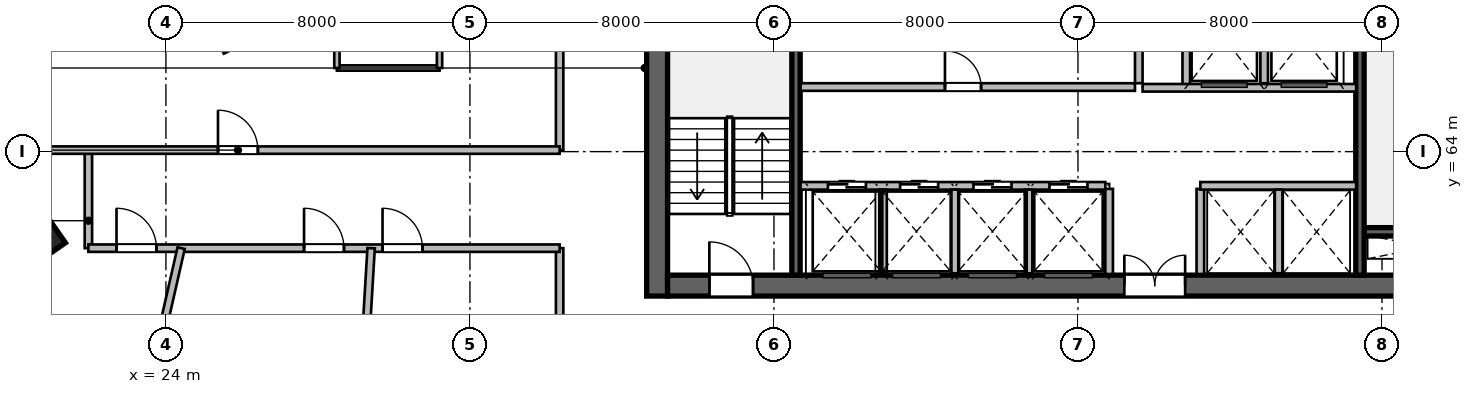
"""IFC4 building model, lengths in metres.
Left out: names, types, materials, properties, quantities, classifications, styles, units other than length and angle.
Written with IfcOpenShell. Run it as: python <this file> out.ifc"""

import sys

from ifc_helpers import new_model, si_unit, direction, frame, frame_2d, origin, origin_2d, place, context, subcontext, project, spatial, rectangle, extrude, source, transform, mapped, element, fill, save


model = new_model("IFC4")
c1 = context("Model", 3, precision=1e-05, world=origin(), true_north=direction((0.0, 1.0)))
c2 = subcontext(c1, "Body", "Model", "MODEL_VIEW")
j1 = project(units=[si_unit("LENGTHUNIT", "METRE"), si_unit("PLANEANGLEUNIT", "RADIAN")], contexts=[c1])
p1 = place(None, origin())
s1 = spatial("IfcSite", under=j1, at=p1, CompositionType="ELEMENT")
p2 = place(p1, origin())
s2 = spatial("IfcBuilding", under=s1, at=p2, CompositionType="ELEMENT")
p3 = place(p2, frame((0.0, 0.0, 78.6)))
s3 = spatial("IfcBuildingStorey", under=s2, at=p3, CompositionType="ELEMENT", Elevation=78.6)
m1 = source(origin(), c2, "Body", "SweptSolid", [
    extrude(rectangle(XDim=12.0, YDim=0.55, at=frame_2d((6.0, 0.0))), origin(), (0.0, 0.0, 1.0), 3.6),
])
p4 = place(p3, frame((36.925, 60.2, 0.0), z_axis=(0.0, 0.0, 1.0), x_axis=(0.0, 1.0, 0.0)))
e1 = element("IfcWall", 1, at=p4, inside=s3, PredefinedType="SHEAR", context=c2, shape_type="MappedRepresentation", body=[
    mapped(m1, transform((0.0, 0.0, 0.0), scale=1.0)),
])
m2 = source(origin(), c2, "Body", "SweptSolid", [
    extrude(rectangle(XDim=21.6, YDim=0.55, at=frame_2d((10.8, 0.0))), origin(), (0.0, 0.0, 1.0), 3.6),
])
p5 = place(p3, frame((37.2, 60.475, 0.0), z_axis=(0.0, 0.0, 1.0), x_axis=(1.0, 0.0, 0.0)))
e2 = element("IfcWall", 2, at=p5, inside=s3, PredefinedType="SHEAR", context=c2, shape_type="MappedRepresentation", body=[
    mapped(m2, transform((0.0, 0.0, 0.0), scale=1.0)),
])
p6 = place(p5, frame((1.1, 0.0, 0.0)))
e3 = element("IfcOpeningElement", 3, at=p6, cuts=e2, PredefinedType="OPENING", context=c2, shape_type="SweptSolid", body=[
    extrude(rectangle(XDim=1.15, YDim=2.15, at=frame_2d((0.575, 1.075))), frame((0.0, 0.285, 0.0), z_axis=(0.0, -1.0, 0.0), x_axis=(1.0, 0.0, 0.0)), (0.0, 0.0, 1.0), 0.57),
])
p7 = place(p5, frame((19.5, 0.0, 0.0)))
e4 = element("IfcOpeningElement", 4, at=p7, cuts=e2, PredefinedType="OPENING", context=c2, shape_type="SweptSolid", body=[
    extrude(rectangle(XDim=0.9, YDim=2.1, at=frame_2d((0.45, 1.05))), frame((0.0, 0.285, 0.0), z_axis=(0.0, -1.0, 0.0), x_axis=(1.0, 0.0, 0.0)), (0.0, 0.0, 1.0), 0.57),
])
p8 = place(p5, frame((12.02, 0.0, 0.0)))
e5 = element("IfcOpeningElement", 5, at=p8, cuts=e2, PredefinedType="OPENING", context=c2, shape_type="SweptSolid", body=[
    extrude(rectangle(XDim=1.6, YDim=2.15, at=frame_2d((0.8, 1.075))), frame((0.0, 0.285, 0.0), z_axis=(0.0, -1.0, 0.0), x_axis=(1.0, 0.0, 0.0)), (0.0, 0.0, 1.0), 0.57),
])
m3 = source(origin(), c2, "Body", "SweptSolid", [
    extrude(rectangle(XDim=3.27, YDim=0.22, at=frame_2d((1.635, 0.0))), origin(), (0.0, 0.0, 1.0), 3.6),
])
p9 = place(p3, frame((55.53, 61.89, 0.0), z_axis=(0.0, 0.0, 1.0), x_axis=(1.0, 0.0, 0.0)))
e6 = element("IfcWall", 6, at=p9, inside=s3, PredefinedType="SHEAR", context=c2, shape_type="MappedRepresentation", body=[
    mapped(m3, transform((0.0, 0.0, 0.0), scale=1.0)),
])
m4 = source(origin(), c2, "Body", "SweptSolid", [
    extrude(rectangle(XDim=10.9, YDim=0.22, at=frame_2d((5.45, 0.0))), origin(), (0.0, 0.0, 1.0), 3.6),
])
p10 = place(p3, frame((40.58, 60.75, 0.0), z_axis=(0.0, 0.0, 1.0), x_axis=(0.0, 1.0, 0.0)))
e7 = element("IfcWall", 7, at=p10, inside=s3, PredefinedType="SHEAR", context=c2, shape_type="MappedRepresentation", body=[
    mapped(m4, transform((0.0, 0.0, 0.0), scale=1.0)),
])
p11 = place(p3, frame((55.42, 60.75, 0.0), z_axis=(0.0, 0.0, 1.0), x_axis=(0.0, 1.0, 0.0)))
e8 = element("IfcWall", 8, at=p11, inside=s3, PredefinedType="SHEAR", context=c2, shape_type="MappedRepresentation", body=[
    mapped(m4, transform((0.0, 0.0, 0.0), scale=1.0)),
])
p12 = place(p11, frame((9.495, 0.0, 0.0)))
e9 = element("IfcOpeningElement", 9, at=p12, cuts=e8, PredefinedType="OPENING", context=c2, shape_type="SweptSolid", body=[
    extrude(rectangle(XDim=1.15, YDim=2.15, at=frame_2d((0.575, 1.075))), frame((0.0, 0.12, 0.0), z_axis=(0.0, -1.0, 0.0), x_axis=(1.0, 0.0, 0.0)), (0.0, 0.0, 1.0), 0.24),
])
m5 = source(origin(), c2, "Body", "SweptSolid", [
    extrude(rectangle(XDim=1.5, YDim=1.5, at=origin_2d()), origin(), (0.0, 0.0, 1.0), 3.6),
])
p13 = place(p3, frame((20.311, 61.789, 0.0), z_axis=(0.0, 0.0, 1.0), x_axis=(-0.571143442153, 0.820850271661, 0.0)))
e10 = element("IfcColumn", 10, at=p13, inside=s3, PredefinedType="COLUMN", context=c2, shape_type="MappedRepresentation", body=[
    mapped(m5, transform((0.0, 0.0, 0.0), scale=1.0)),
])
m6 = source(origin(), c2, "Body", "SweptSolid", [
    extrude(rectangle(XDim=2.24, YDim=0.2, at=frame_2d((1.12, 0.0))), origin(), (0.0, 0.0, 1.0), 3.36),
])
for number, where, z_axis, x_axis in (
    (11, (48.82, 60.78, 0.0), (0.0, 0.0, 1.0), (0.0, 1.0, 0.0)),
    (12, (51.22, 60.78, 0.0), (0.0, 0.0, 1.0), (0.0, 1.0, 0.0)),
):
    element("IfcWall", number, at=place(p3, frame(where, z_axis=z_axis, x_axis=x_axis)), inside=s3, PredefinedType="SOLIDWALL", context=c2, shape_type="MappedRepresentation", body=[
        mapped(m6, transform((0.0, 0.0, 0.0), scale=1.0)),
    ])
m7 = source(origin(), c2, "Body", "SweptSolid", [
    extrude(rectangle(XDim=5.8, YDim=0.2, at=frame_2d((2.9, 0.0))), origin(), (0.0, 0.0, 1.0), 3.36),
])
p14 = place(p3, frame((49.6, 65.8, 0.0), z_axis=(0.0, 0.0, 1.0), x_axis=(0.0, 1.0, 0.0)))
e13 = element("IfcWall", 13, at=p14, inside=s3, PredefinedType="SOLIDWALL", context=c2, shape_type="MappedRepresentation", body=[
    mapped(m7, transform((0.0, 0.0, 0.0), scale=1.0)),
])
m8 = source(origin(), c2, "Body", "SweptSolid", [
    extrude(rectangle(XDim=2.58, YDim=0.2, at=frame_2d((1.29, 0.0))), origin(), (0.0, 0.0, 1.0), 3.36),
])
p15 = place(p3, frame((50.85, 65.68, 0.0), z_axis=(0.0, 0.0, 1.0), x_axis=(0.0, 1.0, 0.0)))
e14 = element("IfcWall", 14, at=p15, inside=s3, PredefinedType="SOLIDWALL", context=c2, shape_type="MappedRepresentation", body=[
    mapped(m8, transform((0.0, 0.0, 0.0), scale=1.0)),
])
m9 = source(origin(), c2, "Body", "SweptSolid", [
    extrude(rectangle(XDim=2.4, YDim=0.2, at=frame_2d((1.2, 0.0))), origin(), (0.0, 0.0, 1.0), 3.36),
])
p16 = place(p3, frame((52.9, 65.8, 0.0), z_axis=(0.0, 0.0, 1.0), x_axis=(0.0, 1.0, 0.0)))
e15 = element("IfcWall", 15, at=p16, inside=s3, PredefinedType="SOLIDWALL", context=c2, shape_type="MappedRepresentation", body=[
    mapped(m9, transform((0.0, 0.0, 0.0), scale=1.0)),
])
m10 = source(origin(), c2, "Body", "SweptSolid", [
    extrude(rectangle(XDim=5.62, YDim=0.2, at=frame_2d((2.81, 0.0))), origin(), (0.0, 0.0, 1.0), 3.36),
])
p17 = place(p3, frame((49.7, 65.68, 0.0), z_axis=(0.0, 0.0, 1.0), x_axis=(1.0, 0.0, 0.0)))
e16 = element("IfcWall", 16, at=p17, inside=s3, PredefinedType="SOLIDWALL", context=c2, shape_type="MappedRepresentation", body=[
    mapped(m10, transform((0.0, 0.0, 0.0), scale=1.0)),
])
m11 = source(origin(), c2, "Body", "SweptSolid", [
    extrude(rectangle(XDim=8.02, YDim=0.2, at=frame_2d((4.01, 0.0))), origin(), (0.0, 0.0, 1.0), 3.36),
])
p18 = place(p3, frame((40.7, 63.1, 0.0), z_axis=(0.0, 0.0, 1.0), x_axis=(1.0, 0.0, 0.0)))
e17 = element("IfcWall", 17, at=p18, inside=s3, PredefinedType="SOLIDWALL", context=c2, shape_type="MappedRepresentation", body=[
    mapped(m11, transform((0.0, 0.0, 0.0), scale=1.0)),
])
p19 = place(p18, frame((0.72, 0.0, 0.0)))
e18 = element("IfcOpeningElement", 18, at=p19, cuts=e17, PredefinedType="OPENING", context=c2, shape_type="SweptSolid", body=[
    extrude(rectangle(XDim=1.0, YDim=2.15, at=frame_2d((0.5, 1.075))), frame((0.0, 0.11, 0.0), z_axis=(0.0, -1.0, 0.0), x_axis=(1.0, 0.0, 0.0)), (0.0, 0.0, 1.0), 0.22),
])
p20 = place(p18, frame((2.62, 0.0, 0.0)))
e19 = element("IfcOpeningElement", 19, at=p20, cuts=e17, PredefinedType="OPENING", context=c2, shape_type="SweptSolid", body=[
    extrude(rectangle(XDim=1.0, YDim=2.15, at=frame_2d((0.5, 1.075))), frame((0.0, 0.11, 0.0), z_axis=(0.0, -1.0, 0.0), x_axis=(1.0, 0.0, 0.0)), (0.0, 0.0, 1.0), 0.22),
])
p21 = place(p18, frame((4.55, 0.0, 0.0)))
e20 = element("IfcOpeningElement", 20, at=p21, cuts=e17, PredefinedType="OPENING", context=c2, shape_type="SweptSolid", body=[
    extrude(rectangle(XDim=1.0, YDim=2.15, at=frame_2d((0.5, 1.075))), frame((0.0, 0.11, 0.0), z_axis=(0.0, -1.0, 0.0), x_axis=(1.0, 0.0, 0.0)), (0.0, 0.0, 1.0), 0.22),
])
p22 = place(p18, frame((6.55, 0.0, 0.0)))
e21 = element("IfcOpeningElement", 21, at=p22, cuts=e17, PredefinedType="OPENING", context=c2, shape_type="SweptSolid", body=[
    extrude(rectangle(XDim=1.0, YDim=2.15, at=frame_2d((0.5, 1.075))), frame((0.0, 0.11, 0.0), z_axis=(0.0, -1.0, 0.0), x_axis=(1.0, 0.0, 0.0)), (0.0, 0.0, 1.0), 0.22),
])
m12 = source(origin(), c2, "Body", "SweptSolid", [
    extrude(rectangle(XDim=4.1, YDim=0.2, at=frame_2d((2.05, 0.0))), origin(), (0.0, 0.0, 1.0), 3.36),
])
p23 = place(p3, frame((51.22, 63.1, 0.0), z_axis=(0.0, 0.0, 1.0), x_axis=(1.0, 0.0, 0.0)))
e22 = element("IfcWall", 22, at=p23, inside=s3, PredefinedType="SOLIDWALL", context=c2, shape_type="MappedRepresentation", body=[
    mapped(m12, transform((0.0, 0.0, 0.0), scale=1.0)),
])
m13 = source(origin(), c2, "Body", "SweptSolid", [
    extrude(rectangle(XDim=2.2, YDim=0.2, at=frame_2d((1.1, 0.0))), origin(), (0.0, 0.0, 1.0), 3.36),
])
for number, where, z_axis, x_axis in (
    (23, (42.87, 60.8, 0.0), (0.0, 0.0, 1.0), (0.0, 1.0, 0.0)),
    (24, (44.77, 60.8, 0.0), (0.0, 0.0, 1.0), (0.0, 1.0, 0.0)),
    (25, (46.7, 60.8, 0.0), (0.0, 0.0, 1.0), (0.0, 1.0, 0.0)),
    (26, (53.28, 60.8, 0.0), (0.0, 0.0, 1.0), (0.0, 1.0, 0.0)),
):
    element("IfcWall", number, at=place(p3, frame(where, z_axis=z_axis, x_axis=x_axis)), inside=s3, PredefinedType="SOLIDWALL", context=c2, shape_type="MappedRepresentation", body=[
        mapped(m13, transform((0.0, 0.0, 0.0), scale=1.0)),
    ])
m14 = source(origin(), c2, "Body", "SweptSolid", [
    extrude(rectangle(XDim=8.8, YDim=0.2, at=frame_2d((4.4, 0.0))), origin(), (0.0, 0.0, 1.0), 3.36),
])
p24 = place(p3, frame((40.7, 65.7, 0.0), z_axis=(0.0, 0.0, 1.0), x_axis=(1.0, 0.0, 0.0)))
e27 = element("IfcWall", 27, at=p24, inside=s3, PredefinedType="SOLIDWALL", context=c2, shape_type="MappedRepresentation", body=[
    mapped(m14, transform((0.0, 0.0, 0.0), scale=1.0)),
])
p25 = place(p24, frame((3.8, 0.0, 0.0)))
e28 = element("IfcOpeningElement", 28, at=p25, cuts=e27, PredefinedType="OPENING", context=c2, shape_type="SweptSolid", body=[
    extrude(rectangle(XDim=0.95, YDim=2.15, at=frame_2d((0.475, 1.075))), frame((0.0, 0.11, 0.0), z_axis=(0.0, -1.0, 0.0), x_axis=(1.0, 0.0, 0.0)), (0.0, 0.0, 1.0), 0.22),
])
m15 = source(origin(), c2, "Body", "SweptSolid", [
    extrude(rectangle(XDim=2.58, YDim=0.195, at=frame_2d((1.29, 0.0))), origin(), (0.0, 0.0, 1.0), 3.36),
])
p26 = place(p3, frame((21.96, 61.46, 0.0), z_axis=(0.0, 0.0, 1.0), x_axis=(0.0, 1.0, 0.0)))
e29 = element("IfcWall", 29, at=p26, inside=s3, PredefinedType="PARTITIONING", context=c2, shape_type="MappedRepresentation", body=[
    mapped(m15, transform((0.0, 0.0, 0.0), scale=1.0)),
])
m16 = source(origin(), c2, "Body", "SweptSolid", [
    extrude(rectangle(XDim=8.18, YDim=0.195, at=frame_2d((4.09, 0.0))), origin(), (0.0, 0.0, 1.0), 3.36),
])
p27 = place(p3, frame((34.36, 64.04, 0.0), z_axis=(0.0, 0.0, 1.0), x_axis=(0.0, 1.0, 0.0)))
e30 = element("IfcWall", 30, at=p27, inside=s3, PredefinedType="PARTITIONING", context=c2, shape_type="MappedRepresentation", body=[
    mapped(m16, transform((0.0, 0.0, 0.0), scale=1.0)),
])
m17 = source(origin(), c2, "Body", "SweptSolid", [
    extrude(rectangle(XDim=16.134, YDim=0.195, at=frame_2d((8.067, 0.0))), origin(), (0.0, 0.0, 1.0), 3.36),
])
p28 = place(p3, frame((34.36, 45.326, 0.0), z_axis=(0.0, 0.0, 1.0), x_axis=(0.0, 1.0, 0.0)))
e31 = element("IfcWall", 31, at=p28, inside=s3, PredefinedType="PARTITIONING", context=c2, shape_type="MappedRepresentation", body=[
    mapped(m17, transform((0.0, 0.0, 0.0), scale=1.0)),
])
m18 = source(origin(), c2, "Body", "SweptSolid", [
    extrude(rectangle(XDim=16.93, YDim=0.195, at=frame_2d((8.465, 0.0))), origin(), (0.0, 0.0, 1.0), 3.36),
])
p29 = place(p3, frame((17.43, 64.04, 0.0), z_axis=(0.0, 0.0, 1.0), x_axis=(1.0, 0.0, 0.0)))
e32 = element("IfcWall", 32, at=p29, inside=s3, PredefinedType="PARTITIONING", context=c2, shape_type="MappedRepresentation", body=[
    mapped(m18, transform((0.0, 0.0, 0.0), scale=1.0)),
])
p30 = place(p29, frame((7.94, 0.0, 0.0)))
e33 = element("IfcOpeningElement", 33, at=p30, cuts=e32, PredefinedType="OPENING", context=c2, shape_type="SweptSolid", body=[
    extrude(rectangle(XDim=1.05, YDim=2.15, at=frame_2d((0.525, 1.075))), frame((0.0, 0.107, 0.0), z_axis=(0.0, -1.0, 0.0), x_axis=(1.0, 0.0, 0.0)), (0.0, 0.0, 1.0), 0.215),
])
m19 = source(origin(), c2, "Body", "SweptSolid", [
    extrude(rectangle(XDim=12.4, YDim=0.195, at=frame_2d((6.2, 0.0))), origin(), (0.0, 0.0, 1.0), 3.36),
])
p31 = place(p3, frame((21.96, 61.46, 0.0), z_axis=(0.0, 0.0, 1.0), x_axis=(1.0, 0.0, 0.0)))
e34 = element("IfcWall", 34, at=p31, inside=s3, PredefinedType="PARTITIONING", context=c2, shape_type="MappedRepresentation", body=[
    mapped(m19, transform((0.0, 0.0, 0.0), scale=1.0)),
])
p32 = place(p31, frame((0.74, 0.0, 0.0)))
e35 = element("IfcOpeningElement", 35, at=p32, cuts=e34, PredefinedType="OPENING", context=c2, shape_type="SweptSolid", body=[
    extrude(rectangle(XDim=1.05, YDim=2.15, at=frame_2d((0.525, 1.075))), frame((0.0, 0.107, 0.0), z_axis=(0.0, -1.0, 0.0), x_axis=(1.0, 0.0, 0.0)), (0.0, 0.0, 1.0), 0.215),
])
p33 = place(p31, frame((5.675, 0.0, 0.0)))
e36 = element("IfcOpeningElement", 36, at=p33, cuts=e34, PredefinedType="OPENING", context=c2, shape_type="SweptSolid", body=[
    extrude(rectangle(XDim=1.05, YDim=2.15, at=frame_2d((0.525, 1.075))), frame((0.0, 0.107, 0.0), z_axis=(0.0, -1.0, 0.0), x_axis=(1.0, 0.0, 0.0)), (0.0, 0.0, 1.0), 0.215),
])
p34 = place(p31, frame((7.74, 0.0, 0.0)))
e37 = element("IfcOpeningElement", 37, at=p34, cuts=e34, PredefinedType="OPENING", context=c2, shape_type="SweptSolid", body=[
    extrude(rectangle(XDim=1.05, YDim=2.15, at=frame_2d((0.525, 1.075))), frame((0.0, 0.107, 0.0), z_axis=(0.0, -1.0, 0.0), x_axis=(1.0, 0.0, 0.0)), (0.0, 0.0, 1.0), 0.215),
])
m20 = source(origin(), c2, "Body", "SweptSolid", [
    extrude(rectangle(XDim=26.476, YDim=0.195, at=frame_2d((13.238, 0.0))), origin(), (0.0, 0.0, 1.0), 2.88),
])
p35 = place(p3, frame((18.52, 35.646, 0.0), z_axis=(0.0, 0.0, 1.0), x_axis=(0.22210613157, 0.975022495289, 0.0)))
e38 = element("IfcWall", 38, at=p35, inside=s3, PredefinedType="PARTITIONING", context=c2, shape_type="MappedRepresentation", body=[
    mapped(m20, transform((0.0, 0.0, 0.0), scale=1.0)),
])
m21 = source(origin(), c2, "Body", "SweptSolid", [
    extrude(rectangle(XDim=24.889, YDim=0.195, at=frame_2d((12.444, 0.0))), origin(), (0.0, 0.0, 1.0), 2.644),
])
p36 = place(p3, frame((27.914, 36.616, 0.0), z_axis=(0.0, 0.0, 1.0), x_axis=(0.059709317989, 0.998215807, 0.0)))
e39 = element("IfcWall", 39, at=p36, inside=s3, PredefinedType="PARTITIONING", context=c2, shape_type="MappedRepresentation", body=[
    mapped(m21, transform((0.0, 0.0, 0.0), scale=1.0)),
])
m22 = source(origin(), c2, "Body", "SweptSolid", [
    extrude(rectangle(XDim=2.7, YDim=0.14, at=frame_2d((1.35, 0.0))), origin(), (0.0, 0.0, 1.0), 3.36),
])
p37 = place(p3, frame((28.5, 66.2, 0.0), z_axis=(0.0, 0.0, 1.0), x_axis=(1.0, 0.0, 0.0)))
e40 = element("IfcWall", 40, at=p37, inside=s3, PredefinedType="PARTITIONING", context=c2, shape_type="MappedRepresentation", body=[
    mapped(m22, transform((0.0, 0.0, 0.0), scale=1.0)),
])
m23 = source(origin(), c2, "Body", "SweptSolid", [
    extrude(rectangle(XDim=2.6, YDim=0.14, at=frame_2d((1.3, 0.0))), origin(), (0.0, 0.0, 1.0), 3.36),
])
p38 = place(p3, frame((28.5, 66.2, 0.0), z_axis=(0.0, 0.0, 1.0), x_axis=(0.0, 1.0, 0.0)))
e41 = element("IfcWall", 41, at=p38, inside=s3, PredefinedType="PARTITIONING", context=c2, shape_type="MappedRepresentation", body=[
    mapped(m23, transform((0.0, 0.0, 0.0), scale=1.0)),
])
p39 = place(p38, frame((0.875, 0.0, 0.0)))
e42 = element("IfcOpeningElement", 42, at=p39, cuts=e41, PredefinedType="OPENING", context=c2, shape_type="SweptSolid", body=[
    extrude(rectangle(XDim=0.85, YDim=2.05, at=frame_2d((0.425, 1.025))), frame((0.0, 0.08, 0.0), z_axis=(0.0, -1.0, 0.0), x_axis=(1.0, 0.0, 0.0)), (0.0, 0.0, 1.0), 0.16),
])
p40 = place(p3, frame((31.2, 66.2, 0.0), z_axis=(0.0, 0.0, 1.0), x_axis=(0.0, 1.0, 0.0)))
e43 = element("IfcWall", 43, at=p40, inside=s3, PredefinedType="PARTITIONING", context=c2, shape_type="MappedRepresentation", body=[
    mapped(m23, transform((0.0, 0.0, 0.0), scale=1.0)),
])
m24 = source(origin(), c2, "Body", "SweptSolid", [
    extrude(rectangle(XDim=1.15, YDim=2.15, at=frame_2d((0.575, 1.075))), frame((0.0, 0.025, 0.0), z_axis=(0.0, -1.0, 0.0), x_axis=(1.0, 0.0, 0.0)), (0.0, 0.0, 1.0), 0.05),
])
p41 = place(p6, origin())
e44 = element("IfcDoor", 44, at=p41, inside=s3, OperationType="SINGLE_SWING_LEFT", PredefinedType="DOOR", context=c2, shape_type="MappedRepresentation", body=[
    mapped(m24, transform((0.0, 0.0, 0.0), scale=1.0)),
])
fill(e3, e44)
m25 = source(origin(), c2, "Body", "SweptSolid", [
    extrude(rectangle(XDim=1.6, YDim=2.15, at=frame_2d((0.8, 1.075))), frame((0.0, 0.025, 0.0), z_axis=(0.0, -1.0, 0.0), x_axis=(1.0, 0.0, 0.0)), (0.0, 0.0, 1.0), 0.05),
])
p42 = place(p8, origin())
e45 = element("IfcDoor", 45, at=p42, inside=s3, OperationType="DOUBLE_DOOR_SINGLE_SWING", PredefinedType="DOOR", context=c2, shape_type="MappedRepresentation", body=[
    mapped(m25, transform((0.0, 0.0, 0.0), scale=1.0)),
])
fill(e5, e45)
m26 = source(origin(), c2, "Body", "SweptSolid", [
    extrude(rectangle(XDim=1.0, YDim=2.15, at=frame_2d((0.5, 1.075))), frame((0.0, 0.025, 0.0), z_axis=(0.0, -1.0, 0.0), x_axis=(1.0, 0.0, 0.0)), (0.0, 0.0, 1.0), 0.05),
])
p43 = place(p19, origin())
e46 = element("IfcDoor", 46, at=p43, inside=s3, OperationType="DOUBLE_DOOR_SLIDING", PredefinedType="DOOR", context=c2, shape_type="MappedRepresentation", body=[
    mapped(m26, transform((0.0, 0.0, 0.0), scale=1.0)),
])
fill(e18, e46)
p44 = place(p20, origin())
e47 = element("IfcDoor", 47, at=p44, inside=s3, OperationType="DOUBLE_DOOR_SLIDING", PredefinedType="DOOR", context=c2, shape_type="MappedRepresentation", body=[
    mapped(m26, transform((0.0, 0.0, 0.0), scale=1.0)),
])
fill(e19, e47)
p45 = place(p21, origin())
e48 = element("IfcDoor", 48, at=p45, inside=s3, OperationType="DOUBLE_DOOR_SLIDING", PredefinedType="DOOR", context=c2, shape_type="MappedRepresentation", body=[
    mapped(m26, transform((0.0, 0.0, 0.0), scale=1.0)),
])
fill(e20, e48)
p46 = place(p22, origin())
e49 = element("IfcDoor", 49, at=p46, inside=s3, OperationType="DOUBLE_DOOR_SLIDING", PredefinedType="DOOR", context=c2, shape_type="MappedRepresentation", body=[
    mapped(m26, transform((0.0, 0.0, 0.0), scale=1.0)),
])
fill(e21, e49)
m27 = source(origin(), c2, "Body", "SweptSolid", [
    extrude(rectangle(XDim=0.95, YDim=2.15, at=frame_2d((0.475, 1.075))), frame((0.0, 0.025, 0.0), z_axis=(0.0, -1.0, 0.0), x_axis=(1.0, 0.0, 0.0)), (0.0, 0.0, 1.0), 0.05),
])
p47 = place(p25, origin())
e50 = element("IfcDoor", 50, at=p47, inside=s3, OperationType="SINGLE_SWING_LEFT", PredefinedType="DOOR", context=c2, shape_type="MappedRepresentation", body=[
    mapped(m27, transform((0.0, 0.0, 0.0), scale=1.0)),
])
fill(e28, e50)
m28 = source(origin(), c2, "Body", "SweptSolid", [
    extrude(rectangle(XDim=1.05, YDim=2.15, at=frame_2d((0.525, 1.075))), frame((0.0, 0.025, 0.0), z_axis=(0.0, -1.0, 0.0), x_axis=(1.0, 0.0, 0.0)), (0.0, 0.0, 1.0), 0.05),
])
p48 = place(p30, origin())
e51 = element("IfcDoor", 51, at=p48, inside=s3, OperationType="SINGLE_SWING_LEFT", PredefinedType="DOOR", context=c2, shape_type="MappedRepresentation", body=[
    mapped(m28, transform((0.0, 0.0, 0.0), scale=1.0)),
])
fill(e33, e51)
p49 = place(p32, origin())
e52 = element("IfcDoor", 52, at=p49, inside=s3, OperationType="SINGLE_SWING_LEFT", PredefinedType="DOOR", context=c2, shape_type="MappedRepresentation", body=[
    mapped(m28, transform((0.0, 0.0, 0.0), scale=1.0)),
])
fill(e35, e52)
p50 = place(p33, origin())
e53 = element("IfcDoor", 53, at=p50, inside=s3, OperationType="SINGLE_SWING_LEFT", PredefinedType="DOOR", context=c2, shape_type="MappedRepresentation", body=[
    mapped(m28, transform((0.0, 0.0, 0.0), scale=1.0)),
])
fill(e36, e53)
p51 = place(p34, origin())
e54 = element("IfcDoor", 54, at=p51, inside=s3, OperationType="SINGLE_SWING_LEFT", PredefinedType="DOOR", context=c2, shape_type="MappedRepresentation", body=[
    mapped(m28, transform((0.0, 0.0, 0.0), scale=1.0)),
])
fill(e37, e54)
save(model, sys.argv[1])
